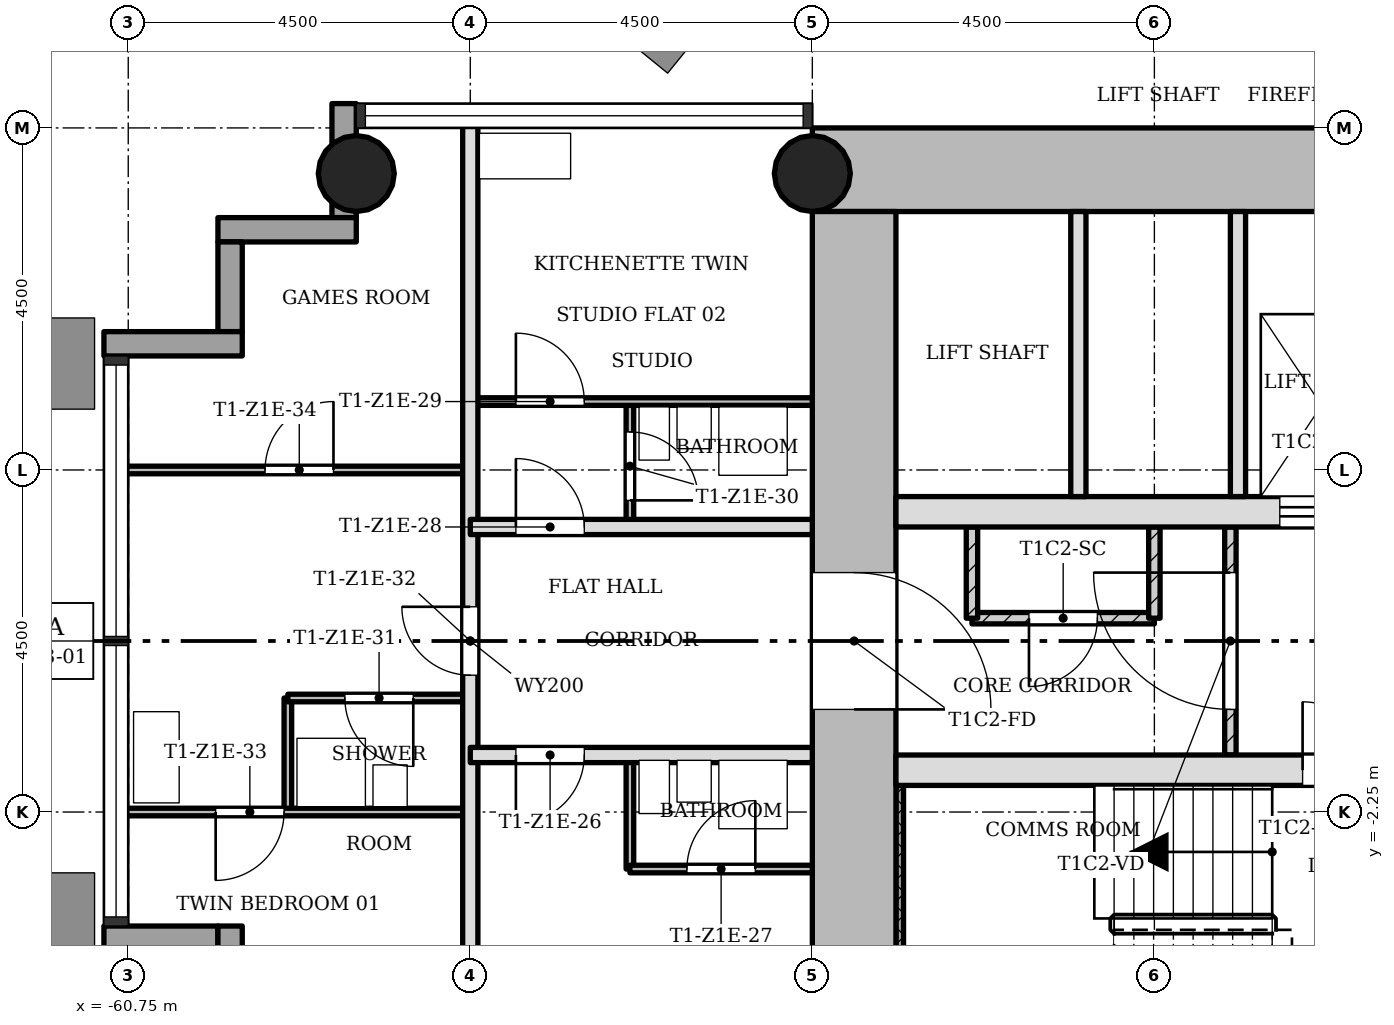
"""IFC4 building model, lengths in metres.
Left out: names, types, materials, properties, quantities, classifications, styles, units other than length and angle.
Written with IfcOpenShell. Run it as: python <this file> out.ifc"""

import sys

from ifc_helpers import new_model, si_unit, direction, frame, frame_2d, origin, origin_2d, place, context, subcontext, project, spatial, rectangle, hollow_circle, extrude, element, fill, save


model = new_model("IFC4")
c1 = context("Model", 3, precision=1e-05, world=origin(), true_north=direction((0.0, 1.0)))
c2 = subcontext(c1, "Body", "Model", "MODEL_VIEW")
j1 = project(units=[si_unit("LENGTHUNIT", "METRE"), si_unit("PLANEANGLEUNIT", "RADIAN")], contexts=[c1])
p1 = place(None, origin())
s1 = spatial("IfcSite", under=j1, at=p1, CompositionType="ELEMENT")
p2 = place(p1, origin())
s2 = spatial("IfcBuilding", under=s1, at=p2, CompositionType="ELEMENT")
p3 = place(p2, frame((0.0, 0.0, 65.3)))
s3 = spatial("IfcBuildingStorey", under=s2, at=p3, CompositionType="ELEMENT", Elevation=65.3)
p4 = place(p3, frame((-43.85, 6.2, 0.0), z_axis=(0.0, 0.0, 1.0), x_axis=(-1.0, 0.0, 0.0)))
e1 = element("IfcWall", 1, at=p4, inside=s3, PredefinedType="SHEAR", context=c2, shape_type="SweptSolid", body=[
    extrude(rectangle(XDim=7.9, YDim=1.1, at=frame_2d((3.95, 0.0))), origin(), (0.0, 0.0, 1.0), 3.4),
])
p5 = place(p3, frame((-51.2, 5.65, 0.0), z_axis=(0.0, 0.0, 1.0), x_axis=(0.0, -1.0, 0.0)))
e2 = element("IfcWall", 2, at=p5, inside=s3, PredefinedType="SHEAR", context=c2, shape_type="SweptSolid", body=[
    extrude(rectangle(XDim=12.4, YDim=1.1, at=frame_2d((6.2, 0.0))), origin(), (0.0, 0.0, 1.0), 3.4),
])
p6 = place(p5, frame((4.75, 0.0, 0.0)))
e3 = element("IfcOpeningElement", 3, at=p6, cuts=e2, PredefinedType="OPENING", context=c2, shape_type="SweptSolid", body=[
    extrude(rectangle(XDim=1.8, YDim=2.1, at=frame_2d((0.9, 1.05))), frame((0.0, 0.56, 0.0), z_axis=(0.0, -1.0, 0.0), x_axis=(1.0, 0.0, 0.0)), (0.0, 0.0, 1.0), 1.12),
])
p7 = place(p3, frame((-50.65, -1.7, 0.0), z_axis=(0.0, 0.0, 1.0), x_axis=(1.0, 0.0, 0.0)))
e4 = element("IfcWall", 4, at=p7, inside=s3, PredefinedType="SHEAR", context=c2, shape_type="SweptSolid", body=[
    extrude(rectangle(XDim=6.8, YDim=0.4, at=frame_2d((3.4, 0.0))), origin(), (0.0, 0.0, 1.0), 3.4),
])
p8 = place(p7, frame((5.35, 0.0, 0.0)))
e5 = element("IfcOpeningElement", 5, at=p8, cuts=e4, PredefinedType="OPENING", context=c2, shape_type="SweptSolid", body=[
    extrude(rectangle(XDim=0.9, YDim=2.1, at=frame_2d((0.45, 1.05))), frame((0.0, 0.21, 0.0), z_axis=(0.0, -1.0, 0.0), x_axis=(1.0, 0.0, 0.0)), (0.0, 0.0, 1.0), 0.42),
])
p9 = place(p3, frame((-50.65, 1.7, 0.0), z_axis=(0.0, 0.0, 1.0), x_axis=(1.0, 0.0, 0.0)))
e6 = element("IfcWall", 6, at=p9, inside=s3, PredefinedType="SHEAR", context=c2, shape_type="SweptSolid", body=[
    extrude(rectangle(XDim=6.8, YDim=0.4, at=frame_2d((3.4, 0.0))), origin(), (0.0, 0.0, 1.0), 3.4),
])
p10 = place(p9, frame((5.05, 0.0, 0.0)))
e7 = element("IfcOpeningElement", 7, at=p10, cuts=e6, PredefinedType="OPENING", context=c2, shape_type="SweptSolid", body=[
    extrude(rectangle(XDim=1.1, YDim=2.1, at=frame_2d((0.55, 1.05))), frame((0.0, 0.21, 0.0), z_axis=(0.0, -1.0, 0.0), x_axis=(1.0, 0.0, 0.0)), (0.0, 0.0, 1.0), 0.42),
])
for number, where, z_axis, x_axis in (
    (8, (-51.75, 6.15, 0.0), (0.0, 0.0, 1.0), (1.0, 0.0, 0.0)),
    (9, (-57.75, 6.15, 0.0), (0.0, 0.0, 1.0), (1.0, 0.0, 0.0)),
):
    element("IfcColumn", number, at=place(p3, frame(where, z_axis=z_axis, x_axis=x_axis)), inside=s3, PredefinedType="COLUMN", context=c2, shape_type="SweptSolid", body=[
        extrude(hollow_circle(Radius=0.5, WallThickness=0.036, at=origin_2d()), origin(), (0.0, 0.0, 1.0), 3.4),
    ])
p11 = place(p3, frame((-61.07, -3.91, -0.3), z_axis=(0.0, 0.0, 1.0), x_axis=(1.0, 0.0, 0.0)))
e10 = element("IfcWall", 10, at=p11, inside=s3, PredefinedType="STANDARD", context=c2, shape_type="SweptSolid", body=[
    extrude(rectangle(XDim=1.5, YDim=0.32, at=frame_2d((0.75, 0.0))), origin(), (0.0, 0.0, 1.0), 3.4),
])
p12 = place(p3, frame((-59.41, -3.75, -0.3), z_axis=(0.0, 0.0, 1.0), x_axis=(0.0, -1.0, 0.0)))
e11 = element("IfcWall", 11, at=p12, inside=s3, PredefinedType="STANDARD", context=c2, shape_type="SweptSolid", body=[
    extrude(rectangle(XDim=1.82, YDim=0.32, at=frame_2d((0.91, 0.0))), origin(), (0.0, 0.0, 1.0), 3.4),
])
p13 = place(p12, frame((0.41, 0.0, 1.2)))
e12 = element("IfcOpeningElement", 12, at=p13, cuts=e11, PredefinedType="OPENING", context=c2, shape_type="SweptSolid", body=[
    extrude(rectangle(XDim=1.0, YDim=1.5, at=frame_2d((0.5, 0.75))), frame((0.0, 0.17, 0.0), z_axis=(0.0, -1.0, 0.0), x_axis=(1.0, 0.0, 0.0)), (0.0, 0.0, 1.0), 0.34),
])
p14 = place(p3, frame((-57.91, 7.07, -0.3), z_axis=(0.0, 0.0, 1.0), x_axis=(0.0, -1.0, 0.0)))
e13 = element("IfcWall", 13, at=p14, inside=s3, PredefinedType="STANDARD", context=c2, shape_type="SweptSolid", body=[
    extrude(rectangle(XDim=1.5, YDim=0.32, at=frame_2d((0.75, 0.0))), origin(), (0.0, 0.0, 1.0), 3.4),
])
p15 = place(p3, frame((-57.75, 5.41, -0.3), z_axis=(0.0, 0.0, 1.0), x_axis=(-1.0, 0.0, 0.0)))
e14 = element("IfcWall", 14, at=p15, inside=s3, PredefinedType="STANDARD", context=c2, shape_type="SweptSolid", body=[
    extrude(rectangle(XDim=1.82, YDim=0.32, at=frame_2d((0.91, 0.0))), origin(), (0.0, 0.0, 1.0), 3.4),
])
p16 = place(p3, frame((-59.41, 5.25, -0.3), z_axis=(0.0, 0.0, 1.0), x_axis=(0.0, -1.0, 0.0)))
e15 = element("IfcWall", 15, at=p16, inside=s3, PredefinedType="STANDARD", context=c2, shape_type="SweptSolid", body=[
    extrude(rectangle(XDim=1.18, YDim=0.32, at=frame_2d((0.59, 0.0))), origin(), (0.0, 0.0, 1.0), 3.4),
])
p17 = place(p3, frame((-59.25, 3.91, -0.3), z_axis=(0.0, 0.0, 1.0), x_axis=(-1.0, 0.0, 0.0)))
e16 = element("IfcWall", 16, at=p17, inside=s3, PredefinedType="STANDARD", context=c2, shape_type="SweptSolid", body=[
    extrude(rectangle(XDim=1.82, YDim=0.32, at=frame_2d((0.91, 0.0))), origin(), (0.0, 0.0, 1.0), 3.4),
])
p18 = place(p3, frame((-46.25, 1.5, 0.0), z_axis=(0.0, 0.0, 1.0), x_axis=(0.0, -1.0, 0.0)))
e17 = element("IfcWall", 17, at=p18, inside=s3, PredefinedType="PARTITIONING", context=c2, shape_type="SweptSolid", body=[
    extrude(rectangle(XDim=3.0, YDim=0.15, at=frame_2d((1.5, 0.0))), origin(), (0.0, 0.0, 1.0), 3.0),
])
p19 = place(p18, frame((0.6, 0.0, 0.0)))
e18 = element("IfcOpeningElement", 18, at=p19, cuts=e17, PredefinedType="OPENING", context=c2, shape_type="SweptSolid", body=[
    extrude(rectangle(XDim=1.8, YDim=2.1, at=frame_2d((0.9, 1.05))), frame((0.0, 0.085, 0.0), z_axis=(0.0, -1.0, 0.0), x_axis=(1.0, 0.0, 0.0)), (0.0, 0.0, 1.0), 0.17),
])
for number, where, z_axis, x_axis in (
    (19, (-46.15, 5.65, 0.0), (0.0, 0.0, 1.0), (0.0, -1.0, 0.0)),
    (20, (-48.25, 5.65, 0.0), (0.0, 0.0, 1.0), (0.0, -1.0, 0.0)),
):
    element("IfcWall", number, at=place(p3, frame(where, z_axis=z_axis, x_axis=x_axis)), inside=s3, PredefinedType="SOLIDWALL", context=c2, shape_type="SweptSolid", body=[
        extrude(rectangle(XDim=3.75, YDim=0.2, at=frame_2d((1.875, 0.0))), origin(), (0.0, 0.0, 1.0), 3.0),
    ])
p20 = place(p3, frame((-47.25, 0.3, 0.0), z_axis=(0.0, 0.0, 1.0), x_axis=(-1.0, 0.0, 0.0)))
e21 = element("IfcWall", 21, at=p20, inside=s3, PredefinedType="PARTITIONING", context=c2, shape_type="SweptSolid", body=[
    extrude(rectangle(XDim=2.4, YDim=0.15, at=frame_2d((1.2, 0.0))), origin(), (0.0, 0.0, 1.0), 3.0),
])
p21 = place(p20, frame((0.75, 0.0, 0.0)))
e22 = element("IfcOpeningElement", 22, at=p21, cuts=e21, PredefinedType="OPENING", context=c2, shape_type="SweptSolid", body=[
    extrude(rectangle(XDim=0.9, YDim=2.1, at=frame_2d((0.45, 1.05))), frame((0.0, 0.085, 0.0), z_axis=(0.0, -1.0, 0.0), x_axis=(1.0, 0.0, 0.0)), (0.0, 0.0, 1.0), 0.17),
])
for number, where, z_axis, x_axis in (
    (23, (-47.25, 0.3, 0.0), (0.0, 0.0, 1.0), (0.0, 1.0, 0.0)),
    (24, (-49.65, 0.3, 0.0), (0.0, 0.0, 1.0), (0.0, 1.0, 0.0)),
):
    element("IfcWall", number, at=place(p3, frame(where, z_axis=z_axis, x_axis=x_axis)), inside=s3, PredefinedType="PARTITIONING", context=c2, shape_type="SweptSolid", body=[
        extrude(rectangle(XDim=1.2, YDim=0.15, at=frame_2d((0.6, 0.0))), origin(), (0.0, 0.0, 1.0), 3.0),
    ])
p22 = place(p3, frame((-58.65, -2.25, 0.0), z_axis=(0.0, 0.0, 1.0), x_axis=(0.0, 1.0, 0.0)))
e25 = element("IfcWall", 25, at=p22, inside=s3, PredefinedType="PARTITIONING", context=c2, shape_type="SweptSolid", body=[
    extrude(rectangle(XDim=1.5, YDim=0.1, at=frame_2d((0.75, 0.0))), origin(), (0.0, 0.0, 1.0), 3.0),
])
p23 = place(p3, frame((-56.25, -6.85, 0.0), z_axis=(0.0, 0.0, 1.0), x_axis=(0.0, 1.0, 0.0)))
e26 = element("IfcWall", 26, at=p23, inside=s3, PredefinedType="SOLIDWALL", context=c2, shape_type="SweptSolid", body=[
    extrude(rectangle(XDim=13.7, YDim=0.2, at=frame_2d((6.85, 0.0))), origin(), (0.0, 0.0, 1.0), 3.0),
])
p24 = place(p23, frame((6.4, 0.0, 0.0)))
e27 = element("IfcOpeningElement", 27, at=p24, cuts=e26, PredefinedType="OPENING", context=c2, shape_type="SweptSolid", body=[
    extrude(rectangle(XDim=0.9, YDim=2.1, at=frame_2d((0.45, 1.05))), frame((0.0, 0.11, 0.0), z_axis=(0.0, -1.0, 0.0), x_axis=(1.0, 0.0, 0.0)), (0.0, 0.0, 1.0), 0.22),
])
p25 = place(p3, frame((-54.15, -3.0, 0.0), z_axis=(0.0, 0.0, 1.0), x_axis=(0.0, 1.0, 0.0)))
e28 = element("IfcWall", 28, at=p25, inside=s3, PredefinedType="PARTITIONING", context=c2, shape_type="SweptSolid", body=[
    extrude(rectangle(XDim=1.5, YDim=0.1, at=frame_2d((0.75, 0.0))), origin(), (0.0, 0.0, 1.0), 3.0),
])
p26 = place(p3, frame((-54.15, 1.5, 0.0), z_axis=(0.0, 0.0, 1.0), x_axis=(0.0, 1.0, 0.0)))
e29 = element("IfcWall", 29, at=p26, inside=s3, PredefinedType="PARTITIONING", context=c2, shape_type="SweptSolid", body=[
    extrude(rectangle(XDim=1.65, YDim=0.1, at=frame_2d((0.825, 0.0))), origin(), (0.0, 0.0, 1.0), 3.0),
])
p27 = place(p26, frame((0.35, 0.0, 0.0)))
e30 = element("IfcOpeningElement", 30, at=p27, cuts=e29, PredefinedType="OPENING", context=c2, shape_type="SweptSolid", body=[
    extrude(rectangle(XDim=0.9, YDim=2.1, at=frame_2d((0.45, 1.05))), frame((0.0, 0.06, 0.0), z_axis=(0.0, -1.0, 0.0), x_axis=(1.0, 0.0, 0.0)), (0.0, 0.0, 1.0), 0.12),
])
p28 = place(p3, frame((-54.15, -3.0, 0.0), z_axis=(0.0, 0.0, 1.0), x_axis=(1.0, 0.0, 0.0)))
e31 = element("IfcWall", 31, at=p28, inside=s3, PredefinedType="PARTITIONING", context=c2, shape_type="SweptSolid", body=[
    extrude(rectangle(XDim=2.4, YDim=0.1, at=frame_2d((1.2, 0.0))), origin(), (0.0, 0.0, 1.0), 3.0),
])
p29 = place(p28, frame((0.75, 0.0, 0.0)))
e32 = element("IfcOpeningElement", 32, at=p29, cuts=e31, PredefinedType="OPENING", context=c2, shape_type="SweptSolid", body=[
    extrude(rectangle(XDim=0.9, YDim=2.1, at=frame_2d((0.45, 1.05))), frame((0.0, 0.06, 0.0), z_axis=(0.0, -1.0, 0.0), x_axis=(1.0, 0.0, 0.0)), (0.0, 0.0, 1.0), 0.12),
])
p30 = place(p3, frame((-60.85, -2.25, 0.0), z_axis=(0.0, 0.0, 1.0), x_axis=(1.0, 0.0, 0.0)))
e33 = element("IfcWall", 33, at=p30, inside=s3, PredefinedType="PARTITIONING", context=c2, shape_type="SweptSolid", body=[
    extrude(rectangle(XDim=4.6, YDim=0.1, at=frame_2d((2.3, 0.0))), origin(), (0.0, 0.0, 1.0), 3.0),
])
p31 = place(p30, frame((1.25, 0.0, 0.0)))
e34 = element("IfcOpeningElement", 34, at=p31, cuts=e33, PredefinedType="OPENING", context=c2, shape_type="SweptSolid", body=[
    extrude(rectangle(XDim=0.9, YDim=2.1, at=frame_2d((0.45, 1.05))), frame((0.0, 0.06, 0.0), z_axis=(0.0, -1.0, 0.0), x_axis=(1.0, 0.0, 0.0)), (0.0, 0.0, 1.0), 0.12),
])
p32 = place(p3, frame((-56.25, -1.5, 0.0), z_axis=(0.0, 0.0, 1.0), x_axis=(1.0, 0.0, 0.0)))
e35 = element("IfcWall", 35, at=p32, inside=s3, PredefinedType="SOLIDWALL", context=c2, shape_type="SweptSolid", body=[
    extrude(rectangle(XDim=4.5, YDim=0.2, at=frame_2d((2.25, 0.0))), origin(), (0.0, 0.0, 1.0), 3.0),
])
p33 = place(p32, frame((0.6, 0.0, 0.0)))
e36 = element("IfcOpeningElement", 36, at=p33, cuts=e35, PredefinedType="OPENING", context=c2, shape_type="SweptSolid", body=[
    extrude(rectangle(XDim=0.9, YDim=2.1, at=frame_2d((0.45, 1.05))), frame((0.0, 0.11, 0.0), z_axis=(0.0, -1.0, 0.0), x_axis=(1.0, 0.0, 0.0)), (0.0, 0.0, 1.0), 0.22),
])
p34 = place(p3, frame((-58.65, -0.75, 0.0), z_axis=(0.0, 0.0, 1.0), x_axis=(1.0, 0.0, 0.0)))
e37 = element("IfcWall", 37, at=p34, inside=s3, PredefinedType="PARTITIONING", context=c2, shape_type="SweptSolid", body=[
    extrude(rectangle(XDim=2.4, YDim=0.1, at=frame_2d((1.2, 0.0))), origin(), (0.0, 0.0, 1.0), 3.0),
])
p35 = place(p34, frame((0.75, 0.0, 0.0)))
e38 = element("IfcOpeningElement", 38, at=p35, cuts=e37, PredefinedType="OPENING", context=c2, shape_type="SweptSolid", body=[
    extrude(rectangle(XDim=0.9, YDim=2.1, at=frame_2d((0.45, 1.05))), frame((0.0, 0.06, 0.0), z_axis=(0.0, -1.0, 0.0), x_axis=(1.0, 0.0, 0.0)), (0.0, 0.0, 1.0), 0.12),
])
p36 = place(p3, frame((-56.25, 1.5, 0.0), z_axis=(0.0, 0.0, 1.0), x_axis=(1.0, 0.0, 0.0)))
e39 = element("IfcWall", 39, at=p36, inside=s3, PredefinedType="SOLIDWALL", context=c2, shape_type="SweptSolid", body=[
    extrude(rectangle(XDim=4.5, YDim=0.2, at=frame_2d((2.25, 0.0))), origin(), (0.0, 0.0, 1.0), 3.0),
])
p37 = place(p36, frame((0.6, 0.0, 0.0)))
e40 = element("IfcOpeningElement", 40, at=p37, cuts=e39, PredefinedType="OPENING", context=c2, shape_type="SweptSolid", body=[
    extrude(rectangle(XDim=0.9, YDim=2.1, at=frame_2d((0.45, 1.05))), frame((0.0, 0.11, 0.0), z_axis=(0.0, -1.0, 0.0), x_axis=(1.0, 0.0, 0.0)), (0.0, 0.0, 1.0), 0.22),
])
p38 = place(p3, frame((-60.85, 2.25, 0.0), z_axis=(0.0, 0.0, 1.0), x_axis=(1.0, 0.0, 0.0)))
e41 = element("IfcWall", 41, at=p38, inside=s3, PredefinedType="PARTITIONING", context=c2, shape_type="SweptSolid", body=[
    extrude(rectangle(XDim=4.6, YDim=0.1, at=frame_2d((2.3, 0.0))), origin(), (0.0, 0.0, 1.0), 3.0),
])
p39 = place(p38, frame((1.9, 0.0, 0.0)))
e42 = element("IfcOpeningElement", 42, at=p39, cuts=e41, PredefinedType="OPENING", context=c2, shape_type="SweptSolid", body=[
    extrude(rectangle(XDim=0.9, YDim=2.1, at=frame_2d((0.45, 1.05))), frame((0.0, 0.06, 0.0), z_axis=(0.0, -1.0, 0.0), x_axis=(1.0, 0.0, 0.0)), (0.0, 0.0, 1.0), 0.12),
])
p40 = place(p3, frame((-56.25, 3.15, 0.0), z_axis=(0.0, 0.0, 1.0), x_axis=(1.0, 0.0, 0.0)))
e43 = element("IfcWall", 43, at=p40, inside=s3, PredefinedType="PARTITIONING", context=c2, shape_type="SweptSolid", body=[
    extrude(rectangle(XDim=4.5, YDim=0.1, at=frame_2d((2.25, 0.0))), origin(), (0.0, 0.0, 1.0), 3.0),
])
p41 = place(p40, frame((0.6, 0.0, 0.0)))
e44 = element("IfcOpeningElement", 44, at=p41, cuts=e43, PredefinedType="OPENING", context=c2, shape_type="SweptSolid", body=[
    extrude(rectangle(XDim=0.9, YDim=2.1, at=frame_2d((0.45, 1.05))), frame((0.0, 0.06, 0.0), z_axis=(0.0, -1.0, 0.0), x_axis=(1.0, 0.0, 0.0)), (0.0, 0.0, 1.0), 0.12),
])
p42 = place(p3, frame((-50.6, -1.9, 0.0), z_axis=(0.0, 0.0, 1.0), x_axis=(0.0, -1.0, 0.0)))
e45 = element("IfcWall", 45, at=p42, inside=s3, PredefinedType="SHEAR", context=c2, shape_type="SweptSolid", body=[
    extrude(rectangle(XDim=3.75, YDim=0.1, at=frame_2d((1.875, 0.0))), origin(), (0.0, 0.0, 1.0), 3.4),
])
p43 = place(p19, origin())
e46 = element("IfcDoor", 46, at=p43, inside=s3, OperationType="SINGLE_SWING_LEFT", PredefinedType="DOOR", context=c2, shape_type="SweptSolid", body=[
    extrude(rectangle(XDim=1.8, YDim=2.1, at=frame_2d((0.9, 1.05))), frame((0.0, 0.025, 0.0), z_axis=(0.0, -1.0, 0.0), x_axis=(1.0, 0.0, 0.0)), (0.0, 0.0, 1.0), 0.05),
])
fill(e18, e46)
p44 = place(p21, origin())
e47 = element("IfcDoor", 47, at=p44, inside=s3, OperationType="SINGLE_SWING_LEFT", PredefinedType="DOOR", context=c2, shape_type="SweptSolid", body=[
    extrude(rectangle(XDim=0.9, YDim=2.1, at=frame_2d((0.45, 1.05))), frame((0.0, 0.025, 0.0), z_axis=(0.0, -1.0, 0.0), x_axis=(1.0, 0.0, 0.0)), (0.0, 0.0, 1.0), 0.05),
])
fill(e22, e47)
p45 = place(p33, origin())
e48 = element("IfcDoor", 48, at=p45, inside=s3, OperationType="SINGLE_SWING_LEFT", PredefinedType="DOOR", context=c2, shape_type="SweptSolid", body=[
    extrude(rectangle(XDim=0.9, YDim=2.1, at=frame_2d((0.45, 1.05))), frame((0.0, 0.025, 0.0), z_axis=(0.0, -1.0, 0.0), x_axis=(1.0, 0.0, 0.0)), (0.0, 0.0, 1.0), 0.05),
])
fill(e36, e48)
p46 = place(p29, origin())
e49 = element("IfcDoor", 49, at=p46, inside=s3, OperationType="SINGLE_SWING_LEFT", PredefinedType="DOOR", context=c2, shape_type="SweptSolid", body=[
    extrude(rectangle(XDim=0.9, YDim=2.1, at=frame_2d((0.45, 1.05))), frame((0.0, 0.025, 0.0), z_axis=(0.0, -1.0, 0.0), x_axis=(1.0, 0.0, 0.0)), (0.0, 0.0, 1.0), 0.05),
])
fill(e32, e49)
p47 = place(p37, origin())
e50 = element("IfcDoor", 50, at=p47, inside=s3, OperationType="SINGLE_SWING_RIGHT", PredefinedType="DOOR", context=c2, shape_type="SweptSolid", body=[
    extrude(rectangle(XDim=0.9, YDim=2.1, at=frame_2d((0.45, 1.05))), frame((0.0, 0.025, 0.0), z_axis=(0.0, -1.0, 0.0), x_axis=(1.0, 0.0, 0.0)), (0.0, 0.0, 1.0), 0.05),
])
fill(e40, e50)
p48 = place(p41, origin())
e51 = element("IfcDoor", 51, at=p48, inside=s3, OperationType="SINGLE_SWING_RIGHT", PredefinedType="DOOR", context=c2, shape_type="SweptSolid", body=[
    extrude(rectangle(XDim=0.9, YDim=2.1, at=frame_2d((0.45, 1.05))), frame((0.0, 0.025, 0.0), z_axis=(0.0, -1.0, 0.0), x_axis=(1.0, 0.0, 0.0)), (0.0, 0.0, 1.0), 0.05),
])
fill(e44, e51)
p49 = place(p27, origin())
e52 = element("IfcDoor", 52, at=p49, inside=s3, OperationType="SINGLE_SWING_LEFT", PredefinedType="DOOR", context=c2, shape_type="SweptSolid", body=[
    extrude(rectangle(XDim=0.9, YDim=2.1, at=frame_2d((0.45, 1.05))), frame((0.0, 0.025, 0.0), z_axis=(0.0, -1.0, 0.0), x_axis=(1.0, 0.0, 0.0)), (0.0, 0.0, 1.0), 0.05),
])
fill(e30, e52)
p50 = place(p35, origin())
e53 = element("IfcDoor", 53, at=p50, inside=s3, OperationType="SINGLE_SWING_RIGHT", PredefinedType="DOOR", context=c2, shape_type="SweptSolid", body=[
    extrude(rectangle(XDim=0.9, YDim=2.1, at=frame_2d((0.45, 1.05))), frame((0.0, 0.025, 0.0), z_axis=(0.0, -1.0, 0.0), x_axis=(1.0, 0.0, 0.0)), (0.0, 0.0, 1.0), 0.05),
])
fill(e38, e53)
p51 = place(p24, origin())
e54 = element("IfcDoor", 54, at=p51, inside=s3, OperationType="SINGLE_SWING_LEFT", PredefinedType="DOOR", context=c2, shape_type="SweptSolid", body=[
    extrude(rectangle(XDim=0.9, YDim=2.1, at=frame_2d((0.45, 1.05))), frame((0.0, 0.025, 0.0), z_axis=(0.0, -1.0, 0.0), x_axis=(1.0, 0.0, 0.0)), (0.0, 0.0, 1.0), 0.05),
])
fill(e27, e54)
p52 = place(p31, origin())
e55 = element("IfcDoor", 55, at=p52, inside=s3, OperationType="SINGLE_SWING_LEFT", PredefinedType="DOOR", context=c2, shape_type="SweptSolid", body=[
    extrude(rectangle(XDim=0.9, YDim=2.1, at=frame_2d((0.45, 1.05))), frame((0.0, 0.025, 0.0), z_axis=(0.0, -1.0, 0.0), x_axis=(1.0, 0.0, 0.0)), (0.0, 0.0, 1.0), 0.05),
])
fill(e34, e55)
p53 = place(p39, origin())
e56 = element("IfcDoor", 56, at=p53, inside=s3, OperationType="SINGLE_SWING_LEFT", PredefinedType="DOOR", context=c2, shape_type="SweptSolid", body=[
    extrude(rectangle(XDim=0.9, YDim=2.1, at=frame_2d((0.45, 1.05))), frame((0.0, 0.025, 0.0), z_axis=(0.0, -1.0, 0.0), x_axis=(1.0, 0.0, 0.0)), (0.0, 0.0, 1.0), 0.05),
])
fill(e42, e56)
p54 = place(p8, origin())
e57 = element("IfcDoor", 57, at=p54, inside=s3, OperationType="SINGLE_SWING_RIGHT", PredefinedType="DOOR", context=c2, shape_type="SweptSolid", body=[
    extrude(rectangle(XDim=0.9, YDim=2.1, at=frame_2d((0.45, 1.05))), frame((0.0, 0.025, 0.0), z_axis=(0.0, -1.0, 0.0), x_axis=(1.0, 0.0, 0.0)), (0.0, 0.0, 1.0), 0.05),
])
fill(e5, e57)
p55 = place(p10, origin())
e58 = element("IfcDoor", 58, at=p55, inside=s3, OperationType="SLIDING_TO_LEFT", PredefinedType="DOOR", context=c2, shape_type="SweptSolid", body=[
    extrude(rectangle(XDim=1.1, YDim=2.1, at=frame_2d((0.55, 1.05))), frame((0.0, 0.025, 0.0), z_axis=(0.0, -1.0, 0.0), x_axis=(1.0, 0.0, 0.0)), (0.0, 0.0, 1.0), 0.05),
])
fill(e7, e58)
p56 = place(p6, origin())
e59 = element("IfcDoor", 59, at=p56, inside=s3, OperationType="SINGLE_SWING_LEFT", PredefinedType="DOOR", context=c2, shape_type="SweptSolid", body=[
    extrude(rectangle(XDim=1.8, YDim=2.1, at=frame_2d((0.9, 1.05))), frame((0.0, 0.025, 0.0), z_axis=(0.0, -1.0, 0.0), x_axis=(1.0, 0.0, 0.0)), (0.0, 0.0, 1.0), 0.05),
])
fill(e3, e59)
save(model, sys.argv[1])
